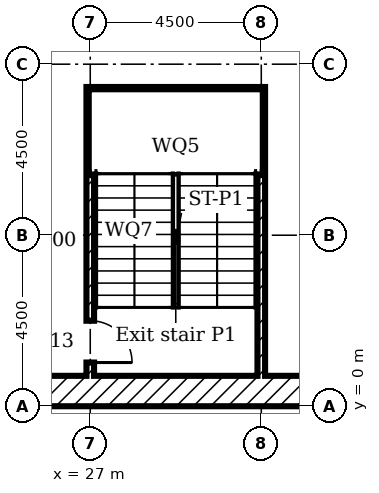
"""IFC4 building model, lengths in metres.
Left out: names, types, materials, properties, quantities, classifications, styles, units other than length and angle.
Written with IfcOpenShell. Run it as: python <this file> out.ifc"""

import sys

from ifc_helpers import new_model, si_unit, direction, frame, frame_2d, origin, place, context, subcontext, project, spatial, rectangle, extrude, element, fill, save


model = new_model("IFC4")
c1 = context("Model", 3, precision=1e-05, world=origin(), true_north=direction((0.0, 1.0)))
c2 = subcontext(c1, "Body", "Model", "MODEL_VIEW")
j1 = project(units=[si_unit("LENGTHUNIT", "METRE"), si_unit("PLANEANGLEUNIT", "RADIAN")], contexts=[c1])
p1 = place(None, origin())
s1 = spatial("IfcSite", under=j1, at=p1, CompositionType="ELEMENT")
p2 = place(p1, origin())
s2 = spatial("IfcBuilding", under=s1, at=p2, CompositionType="ELEMENT")
p3 = place(p2, frame((0.0, 0.0, -4.0)))
s3 = spatial("IfcBuildingStorey", under=s2, at=p3, CompositionType="ELEMENT", Elevation=-4.0)
p4 = place(p3, frame((0.0, 0.4, 0.0)))
e1 = element("IfcWall", 1, at=p4, inside=s3, PredefinedType="SOLIDWALL", context=c2, shape_type="SweptSolid", body=[
    extrude(rectangle(XDim=153.0, YDim=0.8, at=frame_2d((76.5, 0.0))), origin(), (0.0, 0.0, 1.0), 4.0),
])
p5 = place(p3, frame((27.0, 0.8, 0.0), z_axis=(0.0, 0.0, 1.0), x_axis=(0.0, 1.0, 0.0)))
e2 = element("IfcWall", 2, at=p5, inside=s3, PredefinedType="SOLIDWALL", context=c2, shape_type="SweptSolid", body=[
    extrude(rectangle(XDim=7.6, YDim=0.2, at=frame_2d((3.8, 0.0))), origin(), (0.0, 0.0, 1.0), 3.55),
])
p6 = place(p5, frame((0.35, 0.0, 0.0)))
e3 = element("IfcOpeningElement", 3, at=p6, cuts=e2, PredefinedType="OPENING", context=c2, shape_type="SweptSolid", body=[
    extrude(rectangle(XDim=1.1, YDim=2.1, at=frame_2d((0.55, 1.05))), frame((0.0, 0.11, 0.0), z_axis=(0.0, -1.0, 0.0), x_axis=(1.0, 0.0, 0.0)), (0.0, 0.0, 1.0), 0.22),
])
p7 = place(p3, frame((31.5, 0.8, 0.0), z_axis=(0.0, 0.0, 1.0), x_axis=(0.0, 1.0, 0.0)))
e4 = element("IfcWall", 4, at=p7, inside=s3, PredefinedType="SOLIDWALL", context=c2, shape_type="SweptSolid", body=[
    extrude(rectangle(XDim=7.6, YDim=0.2, at=frame_2d((3.8, 0.0))), origin(), (0.0, 0.0, 1.0), 3.55),
])
p8 = place(p3, frame((27.1, 8.3, 0.0)))
e5 = element("IfcWall", 5, at=p8, inside=s3, PredefinedType="SOLIDWALL", context=c2, shape_type="SweptSolid", body=[
    extrude(rectangle(XDim=4.3, YDim=0.2, at=frame_2d((2.15, 0.0))), origin(), (0.0, 0.0, 1.0), 3.55),
])
for number, where in (
    (6, (27.1, 6.22, -2.0)),
    (7, (27.1, 7.6, -2.0)),
):
    element("IfcWall", number, at=place(p3, frame(where)), inside=s3, PredefinedType="SOLIDWALL", context=c2, shape_type="SweptSolid", body=[
        extrude(rectangle(XDim=4.3, YDim=0.2, at=frame_2d((2.15, 0.0))), origin(), (0.0, 0.0, 1.0), 3.8),
    ])
p9 = place(p6, frame((1.1, 0.0, 0.0), x_axis=(-1.0, 0.0, 0.0)))
e8 = element("IfcDoor", 8, at=p9, inside=s3, OperationType="SINGLE_SWING_LEFT", PredefinedType="DOOR", context=c2, shape_type="SweptSolid", body=[
    extrude(rectangle(XDim=1.1, YDim=2.1, at=frame_2d((0.55, 1.05))), frame((0.0, 0.025, 0.0), z_axis=(0.0, -1.0, 0.0), x_axis=(1.0, 0.0, 0.0)), (0.0, 0.0, 1.0), 0.05),
])
fill(e3, e8)
save(model, sys.argv[1])
